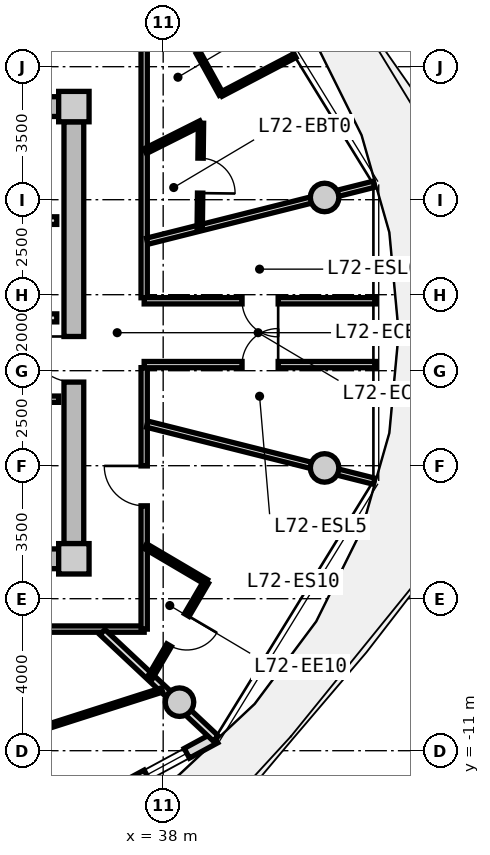
"""IFC4 building model, lengths in metres.
Left out: names, types, materials, properties, quantities, classifications, styles, units other than length and angle.
Written with IfcOpenShell. Run it as: python <this file> out.ifc"""

import sys

from ifc_helpers import new_model, si_unit, direction, frame, frame_2d, origin, origin_2d, place, context, subcontext, project, spatial, rectangle, circle, extrude, source, transform, mapped, element, fill, save


model = new_model("IFC4")
c1 = context("Model", 3, precision=1e-05, world=origin(), true_north=direction((0.0, 1.0)))
c2 = subcontext(c1, "Body", "Model", "MODEL_VIEW")
j1 = project(units=[si_unit("LENGTHUNIT", "METRE"), si_unit("PLANEANGLEUNIT", "RADIAN")], contexts=[c1])
p1 = place(None, origin())
s1 = spatial("IfcSite", under=j1, at=p1, CompositionType="ELEMENT")
p2 = place(p1, origin())
s2 = spatial("IfcBuilding", under=s1, at=p2, CompositionType="ELEMENT")
p3 = place(p2, frame((0.0, 0.0, 232.2)))
s3 = spatial("IfcBuildingStorey", under=s2, at=p3, CompositionType="ELEMENT", Elevation=232.2)
m1 = source(origin(), c2, "Body", "SweptSolid", [
    extrude(rectangle(XDim=0.8, YDim=0.8, at=origin_2d()), origin(), (0.0, 0.0, 1.0), 3.05),
])
for number, where, z_axis, x_axis in (
    (1, (35.65, -5.95, 0.0), (0.0, 0.0, 1.0), (1.0, 0.0, 0.0)),
    (2, (35.65, 5.95, 0.0), (0.0, 0.0, 1.0), (1.0, 0.0, 0.0)),
):
    element("IfcColumn", number, at=place(p3, frame(where, z_axis=z_axis, x_axis=x_axis)), inside=s3, PredefinedType="COLUMN", context=c2, shape_type="MappedRepresentation", body=[
        mapped(m1, transform((0.0, 0.0, 0.0), x_axis=(1.0, 0.0, 0.0), y_axis=(0.0, 1.0, 0.0), z_axis=(0.0, 0.0, 1.0), scale=1.0)),
    ])
m2 = source(origin(), c2, "Body", "SweptSolid", [
    extrude(rectangle(XDim=14.5, YDim=0.52, at=frame_2d((7.25, 0.0))), origin(), (0.0, 0.0, 1.0), 2.81),
])
for number, where, z_axis, x_axis in (
    (3, (20.75, 5.95, 0.0), (0.0, 0.0, 1.0), (1.0, 0.0, 0.0)),
    (4, (35.25, -5.95, 0.0), (0.0, 0.0, 1.0), (-1.0, 0.0, 0.0)),
):
    element("IfcWall", number, at=place(p3, frame(where, z_axis=z_axis, x_axis=x_axis)), inside=s3, PredefinedType="SHEAR", context=c2, shape_type="MappedRepresentation", body=[
        mapped(m2, transform((0.0, 0.0, 0.0), x_axis=(1.0, 0.0, 0.0), y_axis=(0.0, 1.0, 0.0), z_axis=(0.0, 0.0, 1.0), scale=1.0)),
    ])
m3 = source(origin(), c2, "Body", "SweptSolid", [
    extrude(rectangle(XDim=11.1, YDim=0.52, at=frame_2d((5.55, 0.0))), origin(), (0.0, 0.0, 1.0), 2.81),
])
p4 = place(p3, frame((35.65, 5.55, 0.0), z_axis=(0.0, 0.0, 1.0), x_axis=(0.0, -1.0, 0.0)))
e5 = element("IfcWall", 5, at=p4, inside=s3, PredefinedType="SHEAR", context=c2, shape_type="MappedRepresentation", body=[
    mapped(m3, transform((0.0, 0.0, 0.0), x_axis=(1.0, 0.0, 0.0), y_axis=(0.0, 1.0, 0.0), z_axis=(0.0, 0.0, 1.0), scale=1.0)),
])
p5 = place(p4, frame((5.65, 0.0, 0.0)))
e6 = element("IfcOpeningElement", 6, at=p5, cuts=e5, PredefinedType="OPENING", context=c2, shape_type="SweptSolid", body=[
    extrude(rectangle(XDim=1.2, YDim=2.15, at=frame_2d((0.6, 1.075))), frame((0.0, 0.27, 0.0), z_axis=(0.0, -1.0, 0.0), x_axis=(1.0, 0.0, 0.0)), (0.0, 0.0, 1.0), 0.54),
])
m4 = source(origin(), c2, "Body", "SweptSolid", [
    extrude(circle(Radius=0.375, at=origin_2d()), origin(), (0.0, 0.0, 1.0), 3.05),
])
for number, where, z_axis, x_axis in (
    (7, (42.247, 3.559, 0.0), (0.0, 0.0, 1.0), (1.0, 0.0, 0.0)),
    (8, (38.43, -9.723, 0.0), (0.0, 0.0, 1.0), (1.0, 0.0, 0.0)),
    (9, (42.247, -3.559, 0.0), (0.0, 0.0, 1.0), (1.0, 0.0, 0.0)),
):
    element("IfcColumn", number, at=place(p3, frame(where, z_axis=z_axis, x_axis=x_axis)), inside=s3, PredefinedType="COLUMN", context=c2, shape_type="MappedRepresentation", body=[
        mapped(m4, transform((0.0, 0.0, 0.0), x_axis=(1.0, 0.0, 0.0), y_axis=(0.0, 1.0, 0.0), z_axis=(0.0, 0.0, 1.0), scale=1.0)),
    ])
m5 = source(origin(), c2, "Body", "SweptSolid", [
    extrude(rectangle(XDim=8.197, YDim=0.29, at=frame_2d((4.099, 0.0))), origin(), (0.0, 0.0, 1.0), 2.81),
])
p6 = place(p3, frame((39.37, -10.663, 0.0), z_axis=(0.0, 0.0, 1.0), x_axis=(-0.879369910001, -0.476139224791, 0.0)))
e10 = element("IfcWall", 10, at=p6, inside=s3, PredefinedType="SOLIDWALL", context=c2, shape_type="MappedRepresentation", body=[
    mapped(m5, transform((0.0, 0.0, 0.0), x_axis=(1.0, 0.0, 0.0), y_axis=(0.0, 1.0, 0.0), z_axis=(0.0, 0.0, 1.0), scale=1.0)),
])
p7 = place(p6, frame((6.18, 0.0, 0.0)))
e11 = element("IfcOpeningElement", 11, at=p7, cuts=e10, PredefinedType="OPENING", context=c2, shape_type="SweptSolid", body=[
    extrude(rectangle(XDim=1.15, YDim=2.25, at=frame_2d((0.575, 1.125))), frame((0.0, 0.155, 0.0), z_axis=(0.0, -1.0, 0.0), x_axis=(1.0, 0.0, 0.0)), (0.0, 0.0, 1.0), 0.31),
])
p8 = place(p6, frame((0.85, 0.0, 0.85)))
e12 = element("IfcOpeningElement", 12, at=p8, cuts=e10, PredefinedType="OPENING", context=c2, shape_type="SweptSolid", body=[
    extrude(rectangle(XDim=1.2, YDim=1.5, at=frame_2d((0.6, 0.75))), frame((0.0, 0.155, 0.0), z_axis=(0.0, -1.0, 0.0), x_axis=(1.0, 0.0, 0.0)), (0.0, 0.0, 1.0), 0.31),
])
m6 = source(origin(), c2, "Body", "SweptSolid", [
    extrude(rectangle(XDim=3.2, YDim=0.2, at=frame_2d((1.6, 0.0))), origin(), (0.0, 0.0, 1.0), 2.795),
])
p9 = place(p3, frame((32.0, 2.95, 0.0), z_axis=(0.0, 0.0, 1.0), x_axis=(1.0, 0.0, 0.0)))
e13 = element("IfcWall", 13, at=p9, inside=s3, PredefinedType="PARTITIONING", context=c2, shape_type="MappedRepresentation", body=[
    mapped(m6, transform((0.0, 0.0, 0.0), x_axis=(1.0, 0.0, 0.0), y_axis=(0.0, 1.0, 0.0), z_axis=(0.0, 0.0, 1.0), scale=1.0)),
])
m7 = source(origin(), c2, "Body", "SweptSolid", [
    extrude(rectangle(XDim=6.66, YDim=0.21, at=frame_2d((3.33, 0.0))), origin(), (0.0, 0.0, 1.0), 2.795),
])
p10 = place(p3, frame((28.54, 0.39, 0.0), z_axis=(0.0, 0.0, 1.0), x_axis=(1.0, 0.0, 0.0)))
e14 = element("IfcWall", 14, at=p10, inside=s3, PredefinedType="PARTITIONING", context=c2, shape_type="MappedRepresentation", body=[
    mapped(m7, transform((0.0, 0.0, 0.0), x_axis=(1.0, 0.0, 0.0), y_axis=(0.0, 1.0, 0.0), z_axis=(0.0, 0.0, 1.0), scale=1.0)),
])
p11 = place(p10, frame((1.0, 0.0, 0.0)))
e15 = element("IfcOpeningElement", 15, at=p11, cuts=e14, PredefinedType="OPENING", context=c2, shape_type="SweptSolid", body=[
    extrude(rectangle(XDim=1.2, YDim=2.15, at=frame_2d((0.6, 1.075))), frame((0.0, 0.115, 0.0), z_axis=(0.0, -1.0, 0.0), x_axis=(1.0, 0.0, 0.0)), (0.0, 0.0, 1.0), 0.23),
])
m8 = source(origin(), c2, "Body", "SweptSolid", [
    extrude(rectangle(XDim=2.7, YDim=0.165, at=frame_2d((1.35, 0.0))), origin(), (0.0, 0.0, 1.0), 2.795),
])
p12 = place(p3, frame((32.55, -1.75, 0.0), z_axis=(0.0, 0.0, 1.0), x_axis=(1.0, 0.0, 0.0)))
e16 = element("IfcWall", 16, at=p12, inside=s3, PredefinedType="PARTITIONING", context=c2, shape_type="MappedRepresentation", body=[
    mapped(m8, transform((0.0, 0.0, 0.0), x_axis=(1.0, 0.0, 0.0), y_axis=(0.0, 1.0, 0.0), z_axis=(0.0, 0.0, 1.0), scale=1.0)),
])
p13 = place(p12, frame((0.85, 0.0, 0.0)))
e17 = element("IfcOpeningElement", 17, at=p13, cuts=e16, PredefinedType="OPENING", context=c2, shape_type="SweptSolid", body=[
    extrude(rectangle(XDim=0.925, YDim=2.1, at=frame_2d((0.462, 1.05))), frame((0.0, 0.093, 0.0), z_axis=(0.0, -1.0, 0.0), x_axis=(1.0, 0.0, 0.0)), (0.0, 0.0, 1.0), 0.185),
])
m9 = source(origin(), c2, "Body", "SweptSolid", [
    extrude(rectangle(XDim=19.0, YDim=0.165, at=frame_2d((9.5, 0.0))), origin(), (0.0, 0.0, 1.0), 2.795),
])
p14 = place(p3, frame((37.5, -7.8, 0.0), z_axis=(0.0, 0.0, 1.0), x_axis=(-1.0, 0.0, 0.0)))
e18 = element("IfcWall", 18, at=p14, inside=s3, PredefinedType="PARTITIONING", context=c2, shape_type="MappedRepresentation", body=[
    mapped(m9, transform((0.0, 0.0, 0.0), x_axis=(1.0, 0.0, 0.0), y_axis=(0.0, 1.0, 0.0), z_axis=(0.0, 0.0, 1.0), scale=1.0)),
])
p15 = place(p14, frame((9.392, 0.0, 0.0)))
e19 = element("IfcOpeningElement", 19, at=p15, cuts=e18, PredefinedType="OPENING", context=c2, shape_type="SweptSolid", body=[
    extrude(rectangle(XDim=1.05, YDim=2.15, at=frame_2d((0.525, 1.075))), frame((0.0, 0.093, 0.0), z_axis=(0.0, -1.0, 0.0), x_axis=(1.0, 0.0, 0.0)), (0.0, 0.0, 1.0), 0.185),
])
m10 = source(origin(), c2, "Body", "SweptSolid", [
    extrude(rectangle(XDim=6.88, YDim=0.165, at=frame_2d((3.44, 0.0))), origin(), (0.0, 0.0, 1.0), 2.795),
])
p16 = place(p3, frame((37.5, 7.8, 0.0), z_axis=(0.0, 0.0, 1.0), x_axis=(0.0, -1.0, 0.0)))
e20 = element("IfcWall", 20, at=p16, inside=s3, PredefinedType="PARTITIONING", context=c2, shape_type="MappedRepresentation", body=[
    mapped(m10, transform((0.0, 0.0, 0.0), x_axis=(1.0, 0.0, 0.0), y_axis=(0.0, 1.0, 0.0), z_axis=(0.0, 0.0, 1.0), scale=1.0)),
])
p17 = place(p3, frame((37.5, -0.92, 0.0), z_axis=(0.0, 0.0, 1.0), x_axis=(0.0, -1.0, 0.0)))
e21 = element("IfcWall", 21, at=p17, inside=s3, PredefinedType="PARTITIONING", context=c2, shape_type="MappedRepresentation", body=[
    mapped(m10, transform((0.0, 0.0, 0.0), x_axis=(1.0, 0.0, 0.0), y_axis=(0.0, 1.0, 0.0), z_axis=(0.0, 0.0, 1.0), scale=1.0)),
])
p18 = place(p17, frame((2.586, 0.0, 0.0)))
e22 = element("IfcOpeningElement", 22, at=p18, cuts=e21, PredefinedType="OPENING", context=c2, shape_type="SweptSolid", body=[
    extrude(rectangle(XDim=1.05, YDim=2.15, at=frame_2d((0.525, 1.075))), frame((0.0, 0.093, 0.0), z_axis=(0.0, -1.0, 0.0), x_axis=(1.0, 0.0, 0.0)), (0.0, 0.0, 1.0), 0.185),
])
m11 = source(origin(), c2, "Body", "SweptSolid", [
    extrude(rectangle(XDim=6.157, YDim=0.165, at=frame_2d((3.079, 0.0))), origin(), (0.0, 0.0, 1.0), 2.435),
])
p19 = place(p3, frame((37.58, -2.407, 0.0), z_axis=(0.0, 0.0, 1.0), x_axis=(0.969840867184, -0.243738984038, 0.0)))
e23 = element("IfcWall", 23, at=p19, inside=s3, PredefinedType="PARTITIONING", context=c2, shape_type="MappedRepresentation", body=[
    mapped(m11, transform((0.0, 0.0, 0.0), x_axis=(1.0, 0.0, 0.0), y_axis=(0.0, 1.0, 0.0), z_axis=(0.0, 0.0, 1.0), scale=1.0)),
])
m12 = source(origin(), c2, "Body", "SweptSolid", [
    extrude(rectangle(XDim=6.157, YDim=0.165, at=frame_2d((3.079, 0.0))), origin(), (0.0, 0.0, 1.0), 2.395),
])
p20 = place(p3, frame((37.58, 2.407, 0.0), z_axis=(0.0, 0.0, 1.0), x_axis=(0.969840867184, 0.243738984038, 0.0)))
e24 = element("IfcWall", 24, at=p20, inside=s3, PredefinedType="PARTITIONING", context=c2, shape_type="MappedRepresentation", body=[
    mapped(m12, transform((0.0, 0.0, 0.0), x_axis=(1.0, 0.0, 0.0), y_axis=(0.0, 1.0, 0.0), z_axis=(0.0, 0.0, 1.0), scale=1.0)),
])
m13 = source(origin(), c2, "Body", "SweptSolid", [
    extrude(rectangle(XDim=6.101, YDim=0.165, at=frame_2d((3.051, 0.0))), origin(), (0.0, 0.0, 1.0), 2.795),
])
p21 = place(p3, frame((37.5, 0.84, 0.0), z_axis=(0.0, 0.0, 1.0), x_axis=(1.0, 0.0, 0.0)))
e25 = element("IfcWall", 25, at=p21, inside=s3, PredefinedType="PARTITIONING", context=c2, shape_type="MappedRepresentation", body=[
    mapped(m13, transform((0.0, 0.0, 0.0), x_axis=(1.0, 0.0, 0.0), y_axis=(0.0, 1.0, 0.0), z_axis=(0.0, 0.0, 1.0), scale=1.0)),
])
p22 = place(p21, frame((2.576, 0.0, 0.0)))
e26 = element("IfcOpeningElement", 26, at=p22, cuts=e25, PredefinedType="OPENING", context=c2, shape_type="SweptSolid", body=[
    extrude(rectangle(XDim=0.95, YDim=2.1, at=frame_2d((0.475, 1.05))), frame((0.0, 0.093, 0.0), z_axis=(0.0, -1.0, 0.0), x_axis=(1.0, 0.0, 0.0)), (0.0, 0.0, 1.0), 0.185),
])
p23 = place(p3, frame((43.601, -0.84, 0.0), z_axis=(0.0, 0.0, 1.0), x_axis=(-1.0, 0.0, 0.0)))
e27 = element("IfcWall", 27, at=p23, inside=s3, PredefinedType="PARTITIONING", context=c2, shape_type="MappedRepresentation", body=[
    mapped(m13, transform((0.0, 0.0, 0.0), x_axis=(1.0, 0.0, 0.0), y_axis=(0.0, 1.0, 0.0), z_axis=(0.0, 0.0, 1.0), scale=1.0)),
])
p24 = place(p23, frame((2.576, 0.0, 0.0)))
e28 = element("IfcOpeningElement", 28, at=p24, cuts=e27, PredefinedType="OPENING", context=c2, shape_type="SweptSolid", body=[
    extrude(rectangle(XDim=0.95, YDim=2.1, at=frame_2d((0.475, 1.05))), frame((0.0, 0.093, 0.0), z_axis=(0.0, -1.0, 0.0), x_axis=(1.0, 0.0, 0.0)), (0.0, 0.0, 1.0), 0.185),
])
m14 = source(origin(), c2, "Body", "SweptSolid", [
    extrude(rectangle(XDim=1.638, YDim=0.14, at=frame_2d((0.819, 0.0))), origin(), (0.0, 0.0, 1.0), 2.795),
])
p25 = place(p3, frame((37.53, 4.778, 0.0), z_axis=(0.0, 0.0, 1.0), x_axis=(0.893919977945, 0.448226586707, 0.0)))
e29 = element("IfcWall", 29, at=p25, inside=s3, PredefinedType="PARTITIONING", context=c2, shape_type="MappedRepresentation", body=[
    mapped(m14, transform((0.0, 0.0, 0.0), x_axis=(1.0, 0.0, 0.0), y_axis=(0.0, 1.0, 0.0), z_axis=(0.0, 0.0, 1.0), scale=1.0)),
])
m15 = source(origin(), c2, "Body", "SweptSolid", [
    extrude(rectangle(XDim=2.759, YDim=0.14, at=frame_2d((1.379, 0.0))), origin(), (0.0, 0.0, 1.0), 2.795),
])
p26 = place(p3, frame((38.995, 5.513, 0.0), z_axis=(0.0, 0.0, 1.0), x_axis=(-0.01194710728, -0.999928630767, 0.0)))
e30 = element("IfcWall", 30, at=p26, inside=s3, PredefinedType="PARTITIONING", context=c2, shape_type="MappedRepresentation", body=[
    mapped(m15, transform((0.0, 0.0, 0.0), x_axis=(1.0, 0.0, 0.0), y_axis=(0.0, 1.0, 0.0), z_axis=(0.0, 0.0, 1.0), scale=1.0)),
])
p27 = place(p26, frame((0.919, 0.0, 0.0)))
e31 = element("IfcOpeningElement", 31, at=p27, cuts=e30, PredefinedType="OPENING", context=c2, shape_type="SweptSolid", body=[
    extrude(rectangle(XDim=0.92, YDim=2.1, at=frame_2d((0.46, 1.05))), frame((0.0, 0.08, 0.0), z_axis=(0.0, -1.0, 0.0), x_axis=(1.0, 0.0, 0.0)), (0.0, 0.0, 1.0), 0.16),
])
m16 = source(origin(), c2, "Body", "SweptSolid", [
    extrude(rectangle(XDim=2.193, YDim=0.115, at=frame_2d((1.097, 0.0))), origin(), (0.0, 0.0, 1.0), 2.795),
])
p28 = place(p3, frame((39.525, 6.275, 0.0), z_axis=(0.0, 0.0, 1.0), x_axis=(0.885783595046, 0.464098505435, 0.0)))
e32 = element("IfcWall", 32, at=p28, inside=s3, PredefinedType="PARTITIONING", context=c2, shape_type="MappedRepresentation", body=[
    mapped(m16, transform((0.0, 0.0, 0.0), x_axis=(1.0, 0.0, 0.0), y_axis=(0.0, 1.0, 0.0), z_axis=(0.0, 0.0, 1.0), scale=1.0)),
])
m17 = source(origin(), c2, "Body", "SweptSolid", [
    extrude(rectangle(XDim=3.45, YDim=0.115, at=frame_2d((1.725, 0.0))), origin(), (0.0, 0.0, 1.0), 2.795),
])
p29 = place(p3, frame((39.525, 6.275, 0.0), z_axis=(0.0, 0.0, 1.0), x_axis=(-0.483659007882, 0.875256513312, 0.0)))
e33 = element("IfcWall", 33, at=p29, inside=s3, PredefinedType="PARTITIONING", context=c2, shape_type="MappedRepresentation", body=[
    mapped(m17, transform((0.0, 0.0, 0.0), x_axis=(1.0, 0.0, 0.0), y_axis=(0.0, 1.0, 0.0), z_axis=(0.0, 0.0, 1.0), scale=1.0)),
])
p30 = place(p29, frame((1.25, 0.0, 0.0)))
e34 = element("IfcOpeningElement", 34, at=p30, cuts=e33, PredefinedType="OPENING", context=c2, shape_type="SweptSolid", body=[
    extrude(rectangle(XDim=0.95, YDim=2.1, at=frame_2d((0.475, 1.05))), frame((0.0, 0.067, 0.0), z_axis=(0.0, -1.0, 0.0), x_axis=(1.0, 0.0, 0.0)), (0.0, 0.0, 1.0), 0.135),
])
m18 = source(origin(), c2, "Body", "SweptSolid", [
    extrude(rectangle(XDim=4.089, YDim=0.19, at=frame_2d((2.044, 0.0))), origin(), (0.0, 0.0, 1.0), 2.395),
])
p31 = place(p3, frame((36.402, -7.88, 0.0), z_axis=(0.0, 0.0, 1.0), x_axis=(0.729401273609, -0.684086092577, 0.0)))
e35 = element("IfcWall", 35, at=p31, inside=s3, PredefinedType="PARTITIONING", context=c2, shape_type="MappedRepresentation", body=[
    mapped(m18, transform((0.0, 0.0, 0.0), x_axis=(1.0, 0.0, 0.0), y_axis=(0.0, 1.0, 0.0), z_axis=(0.0, 0.0, 1.0), scale=1.0)),
])
m19 = source(origin(), c2, "Body", "SweptSolid", [
    extrude(rectangle(XDim=7.024, YDim=0.115, at=frame_2d((3.512, 0.0))), origin(), (0.0, 0.0, 1.0), 2.795),
])
p32 = place(p3, frame((31.28, -11.542, 0.0), z_axis=(0.0, 0.0, 1.0), x_axis=(0.952454006655, 0.304682400552, 0.0)))
e36 = element("IfcWall", 36, at=p32, inside=s3, PredefinedType="PARTITIONING", context=c2, shape_type="MappedRepresentation", body=[
    mapped(m19, transform((0.0, 0.0, 0.0), x_axis=(1.0, 0.0, 0.0), y_axis=(0.0, 1.0, 0.0), z_axis=(0.0, 0.0, 1.0), scale=1.0)),
])
p33 = place(p32, frame((3.037, 0.0, 0.0)))
e37 = element("IfcOpeningElement", 37, at=p33, cuts=e36, PredefinedType="OPENING", context=c2, shape_type="SweptSolid", body=[
    extrude(rectangle(XDim=0.95, YDim=2.1, at=frame_2d((0.475, 1.05))), frame((0.0, 0.067, 0.0), z_axis=(0.0, -1.0, 0.0), x_axis=(1.0, 0.0, 0.0)), (0.0, 0.0, 1.0), 0.135),
])
m20 = source(origin(), c2, "Body", "SweptSolid", [
    extrude(rectangle(XDim=1.859, YDim=0.14, at=frame_2d((0.93, 0.0))), origin(), (0.0, 0.0, 1.0), 2.795),
])
p34 = place(p3, frame((37.53, -5.615, 0.0), z_axis=(0.0, 0.0, 1.0), x_axis=(0.861555897139, -0.507662718845, 0.0)))
e38 = element("IfcWall", 38, at=p34, inside=s3, PredefinedType="PARTITIONING", context=c2, shape_type="MappedRepresentation", body=[
    mapped(m20, transform((0.0, 0.0, 0.0), x_axis=(1.0, 0.0, 0.0), y_axis=(0.0, 1.0, 0.0), z_axis=(0.0, 0.0, 1.0), scale=1.0)),
])
m21 = source(origin(), c2, "Body", "SweptSolid", [
    extrude(rectangle(XDim=2.939, YDim=0.14, at=frame_2d((1.47, 0.0))), origin(), (0.0, 0.0, 1.0), 2.795),
])
p35 = place(p3, frame((39.132, -6.559, 0.0), z_axis=(0.0, 0.0, 1.0), x_axis=(-0.505883614636, -0.862601743821, 0.0)))
e39 = element("IfcWall", 39, at=p35, inside=s3, PredefinedType="PARTITIONING", context=c2, shape_type="MappedRepresentation", body=[
    mapped(m21, transform((0.0, 0.0, 0.0), x_axis=(1.0, 0.0, 0.0), y_axis=(0.0, 1.0, 0.0), z_axis=(0.0, 0.0, 1.0), scale=1.0)),
])
p36 = place(p35, frame((1.01, 0.0, 0.0)))
e40 = element("IfcOpeningElement", 40, at=p36, cuts=e39, PredefinedType="OPENING", context=c2, shape_type="SweptSolid", body=[
    extrude(rectangle(XDim=0.92, YDim=2.1, at=frame_2d((0.46, 1.05))), frame((0.0, 0.08, 0.0), z_axis=(0.0, -1.0, 0.0), x_axis=(1.0, 0.0, 0.0)), (0.0, 0.0, 1.0), 0.16),
])
m22 = source(origin(), c2, "Body", "SweptSolid", [
    extrude(rectangle(XDim=1.2, YDim=1.5, at=frame_2d((0.6, 0.75))), frame((0.0, 0.03, 0.0), z_axis=(0.0, -1.0, 0.0), x_axis=(1.0, 0.0, 0.0)), (0.0, 0.0, 1.0), 0.06),
])
p37 = place(p8, origin())
e41 = element("IfcWindow", 41, at=p37, inside=s3, PartitioningType="SINGLE_PANEL", PredefinedType="WINDOW", context=c2, shape_type="MappedRepresentation", body=[
    mapped(m22, transform((0.0, 0.0, 0.0), x_axis=(1.0, 0.0, 0.0), y_axis=(0.0, 1.0, 0.0), z_axis=(0.0, 0.0, 1.0), scale=1.0)),
])
fill(e12, e41)
m23 = source(origin(), c2, "Body", "SweptSolid", [
    extrude(rectangle(XDim=1.2, YDim=2.15, at=frame_2d((0.6, 1.075))), frame((0.0, 0.025, 0.0), z_axis=(0.0, -1.0, 0.0), x_axis=(1.0, 0.0, 0.0)), (0.0, 0.0, 1.0), 0.05),
])
p38 = place(p5, frame((1.2, 0.0, 0.0), z_axis=(0.0, 0.0, 1.0), x_axis=(-1.0, 0.0, 0.0)))
e42 = element("IfcDoor", 42, at=p38, inside=s3, OperationType="SINGLE_SWING_RIGHT", PredefinedType="DOOR", context=c2, shape_type="MappedRepresentation", body=[
    mapped(m23, transform((0.0, 0.0, 0.0), x_axis=(1.0, 0.0, 0.0), y_axis=(0.0, 1.0, 0.0), z_axis=(0.0, 0.0, 1.0), scale=1.0)),
])
fill(e6, e42)
m24 = source(origin(), c2, "Body", "SweptSolid", [
    extrude(rectangle(XDim=0.95, YDim=2.1, at=frame_2d((0.475, 1.05))), frame((0.0, 0.025, 0.0), z_axis=(0.0, -1.0, 0.0), x_axis=(1.0, 0.0, 0.0)), (0.0, 0.0, 1.0), 0.05),
])
p39 = place(p24, frame((0.95, 0.0, 0.0), z_axis=(0.0, 0.0, 1.0), x_axis=(-1.0, 0.0, 0.0)))
e43 = element("IfcDoor", 43, at=p39, inside=s3, OperationType="SINGLE_SWING_RIGHT", PredefinedType="DOOR", context=c2, shape_type="MappedRepresentation", body=[
    mapped(m24, transform((0.0, 0.0, 0.0), x_axis=(1.0, 0.0, 0.0), y_axis=(0.0, 1.0, 0.0), z_axis=(0.0, 0.0, 1.0), scale=1.0)),
])
fill(e28, e43)
p40 = place(p22, frame((0.95, 0.0, 0.0), z_axis=(0.0, 0.0, 1.0), x_axis=(-1.0, 0.0, 0.0)))
e44 = element("IfcDoor", 44, at=p40, inside=s3, OperationType="SINGLE_SWING_LEFT", PredefinedType="DOOR", context=c2, shape_type="MappedRepresentation", body=[
    mapped(m24, transform((0.0, 0.0, 0.0), x_axis=(1.0, 0.0, 0.0), y_axis=(0.0, 1.0, 0.0), z_axis=(0.0, 0.0, 1.0), scale=1.0)),
])
fill(e26, e44)
m25 = source(origin(), c2, "Body", "SweptSolid", [
    extrude(rectangle(XDim=0.92, YDim=2.1, at=frame_2d((0.46, 1.05))), frame((0.0, 0.025, 0.0), z_axis=(0.0, -1.0, 0.0), x_axis=(1.0, 0.0, 0.0)), (0.0, 0.0, 1.0), 0.05),
])
p41 = place(p27, origin())
e45 = element("IfcDoor", 45, at=p41, inside=s3, OperationType="SINGLE_SWING_RIGHT", PredefinedType="DOOR", context=c2, shape_type="MappedRepresentation", body=[
    mapped(m25, transform((0.0, 0.0, 0.0), x_axis=(1.0, 0.0, 0.0), y_axis=(0.0, 1.0, 0.0), z_axis=(0.0, 0.0, 1.0), scale=1.0)),
])
fill(e31, e45)
p42 = place(p30, frame((0.95, 0.0, 0.0), z_axis=(0.0, 0.0, 1.0), x_axis=(-1.0, 0.0, 0.0)))
e46 = element("IfcDoor", 46, at=p42, inside=s3, OperationType="SINGLE_SWING_LEFT", PredefinedType="DOOR", context=c2, shape_type="MappedRepresentation", body=[
    mapped(m24, transform((0.0, 0.0, 0.0), x_axis=(1.0, 0.0, 0.0), y_axis=(0.0, 1.0, 0.0), z_axis=(0.0, 0.0, 1.0), scale=1.0)),
])
fill(e34, e46)
p43 = place(p33, origin())
e47 = element("IfcDoor", 47, at=p43, inside=s3, OperationType="SINGLE_SWING_RIGHT", PredefinedType="DOOR", context=c2, shape_type="MappedRepresentation", body=[
    mapped(m24, transform((0.0, 0.0, 0.0), x_axis=(1.0, 0.0, 0.0), y_axis=(0.0, 1.0, 0.0), z_axis=(0.0, 0.0, 1.0), scale=1.0)),
])
fill(e37, e47)
m26 = source(origin(), c2, "Body", "SweptSolid", [
    extrude(rectangle(XDim=1.05, YDim=2.15, at=frame_2d((0.525, 1.075))), frame((0.0, 0.025, 0.0), z_axis=(0.0, -1.0, 0.0), x_axis=(1.0, 0.0, 0.0)), (0.0, 0.0, 1.0), 0.05),
])
p44 = place(p18, frame((1.05, 0.0, 0.0), z_axis=(0.0, 0.0, 1.0), x_axis=(-1.0, 0.0, 0.0)))
e48 = element("IfcDoor", 48, at=p44, inside=s3, OperationType="SINGLE_SWING_RIGHT", PredefinedType="DOOR", context=c2, shape_type="MappedRepresentation", body=[
    mapped(m26, transform((0.0, 0.0, 0.0), x_axis=(1.0, 0.0, 0.0), y_axis=(0.0, 1.0, 0.0), z_axis=(0.0, 0.0, 1.0), scale=1.0)),
])
fill(e22, e48)
p45 = place(p36, origin())
e49 = element("IfcDoor", 49, at=p45, inside=s3, OperationType="SINGLE_SWING_LEFT", PredefinedType="DOOR", context=c2, shape_type="MappedRepresentation", body=[
    mapped(m25, transform((0.0, 0.0, 0.0), x_axis=(1.0, 0.0, 0.0), y_axis=(0.0, 1.0, 0.0), z_axis=(0.0, 0.0, 1.0), scale=1.0)),
])
fill(e40, e49)
save(model, sys.argv[1])
